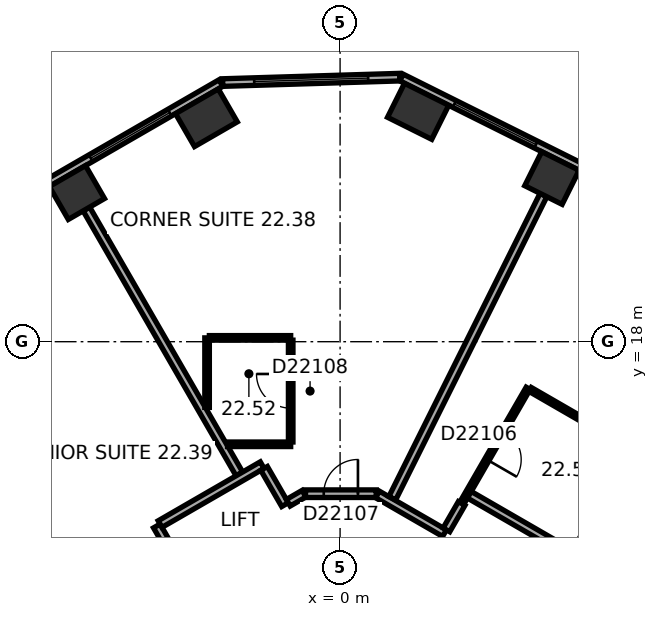
"""IFC4 building model, lengths in metres.
Left out: names, types, materials, properties, quantities, classifications, styles, units other than length and angle.
Written with IfcOpenShell. Run it as: python <this file> out.ifc"""

import sys

from ifc_helpers import new_model, si_unit, direction, frame, frame_2d, origin, origin_2d, place, context, subcontext, project, spatial, rectangle, extrude, element, fill, save


model = new_model("IFC4")
c1 = context("Model", 3, precision=1e-05, world=origin(), true_north=direction((0.0, 1.0)))
c2 = subcontext(c1, "Body", "Model", "MODEL_VIEW")
j1 = project(units=[si_unit("LENGTHUNIT", "METRE"), si_unit("PLANEANGLEUNIT", "RADIAN")], contexts=[c1])
p1 = place(None, origin())
s1 = spatial("IfcSite", under=j1, at=p1, CompositionType="ELEMENT")
p2 = place(p1, origin())
s2 = spatial("IfcBuilding", under=s1, at=p2, CompositionType="ELEMENT")
p3 = place(p2, frame((0.0, 0.0, 96.8)))
s3 = spatial("IfcBuildingStorey", under=s2, at=p3, CompositionType="ELEMENT", Elevation=96.8)
p4 = place(p3, frame((5.574, 22.306, 0.0), z_axis=(0.0, 0.0, 1.0), x_axis=(-0.894934361602, 0.44619781311, 0.0)))
e1 = element("IfcColumn", 1, at=p4, inside=s3, PredefinedType="COLUMN", context=c2, shape_type="SweptSolid", body=[
    extrude(rectangle(XDim=1.1, YDim=1.0, at=origin_2d()), origin(), (0.0, 0.0, 1.0), 3.3),
])
for number, where, z_axis, x_axis in (
    (2, (2.053, 24.062, 0.0), (0.0, 0.0, 1.0), (-0.895, 0.446, 0.0)),
    (3, (-3.518, 23.892, 0.0), (0.0, 0.0, 1.0), (-0.866, -0.5, 0.0)),
):
    element("IfcColumn", number, at=place(p3, frame(where, z_axis=z_axis, x_axis=x_axis)), inside=s3, PredefinedType="COLUMN", context=c2, shape_type="SweptSolid", body=[
        extrude(rectangle(XDim=1.3, YDim=1.0, at=origin_2d()), origin(), (0.0, 0.0, 1.0), 3.3),
    ])
p5 = place(p3, frame((-6.926, 21.925, 0.0), z_axis=(0.0, 0.0, 1.0), x_axis=(-0.866025403784, -0.5, 0.0)))
e4 = element("IfcColumn", 4, at=p5, inside=s3, PredefinedType="COLUMN", context=c2, shape_type="SweptSolid", body=[
    extrude(rectangle(XDim=1.1, YDim=1.0, at=origin_2d()), origin(), (0.0, 0.0, 1.0), 3.3),
])
p6 = place(p3, frame((20.63, 15.47, 0.0), z_axis=(0.0, 0.0, 1.0), x_axis=(-0.894934518609, 0.446197498203, 0.0)))
e5 = element("IfcWall", 5, at=p6, inside=s3, PredefinedType="STANDARD", context=c2, shape_type="SweptSolid", body=[
    extrude(rectangle(XDim=21.246, YDim=0.2, at=frame_2d((10.623, 0.0))), origin(), (0.0, 0.0, 1.0), 3.3),
])
p7 = place(p6, frame((1.553, 0.0, 0.8)))
e6 = element("IfcOpeningElement", 6, at=p7, cuts=e5, PredefinedType="OPENING", context=c2, shape_type="SweptSolid", body=[
    extrude(rectangle(XDim=2.4, YDim=1.7, at=frame_2d((1.2, 0.85))), frame((0.0, 0.11, 0.0), z_axis=(0.0, -1.0, 0.0), x_axis=(1.0, 0.0, 0.0)), (0.0, 0.0, 1.0), 0.22),
])
p8 = place(p6, frame((5.488, 0.0, 0.8)))
e7 = element("IfcOpeningElement", 7, at=p8, cuts=e5, PredefinedType="OPENING", context=c2, shape_type="SweptSolid", body=[
    extrude(rectangle(XDim=2.4, YDim=1.7, at=frame_2d((1.2, 0.85))), frame((0.0, 0.11, 0.0), z_axis=(0.0, -1.0, 0.0), x_axis=(1.0, 0.0, 0.0)), (0.0, 0.0, 1.0), 0.22),
])
p9 = place(p6, frame((9.422, 0.0, 0.8)))
e8 = element("IfcOpeningElement", 8, at=p9, cuts=e5, PredefinedType="OPENING", context=c2, shape_type="SweptSolid", body=[
    extrude(rectangle(XDim=2.4, YDim=1.7, at=frame_2d((1.2, 0.85))), frame((0.0, 0.11, 0.0), z_axis=(0.0, -1.0, 0.0), x_axis=(1.0, 0.0, 0.0)), (0.0, 0.0, 1.0), 0.22),
])
p10 = place(p6, frame((13.357, 0.0, 0.8)))
e9 = element("IfcOpeningElement", 9, at=p10, cuts=e5, PredefinedType="OPENING", context=c2, shape_type="SweptSolid", body=[
    extrude(rectangle(XDim=2.4, YDim=1.7, at=frame_2d((1.2, 0.85))), frame((0.0, 0.11, 0.0), z_axis=(0.0, -1.0, 0.0), x_axis=(1.0, 0.0, 0.0)), (0.0, 0.0, 1.0), 0.22),
])
p11 = place(p6, frame((17.292, 0.0, 0.8)))
e10 = element("IfcOpeningElement", 10, at=p11, cuts=e5, PredefinedType="OPENING", context=c2, shape_type="SweptSolid", body=[
    extrude(rectangle(XDim=2.4, YDim=1.7, at=frame_2d((1.2, 0.85))), frame((0.0, 0.11, 0.0), z_axis=(0.0, -1.0, 0.0), x_axis=(1.0, 0.0, 0.0)), (0.0, 0.0, 1.0), 0.22),
])
p12 = place(p3, frame((1.568, 24.961, 0.0), z_axis=(0.0, 0.0, 1.0), x_axis=(-0.999533359013, -0.030546099927, 0.0)))
e11 = element("IfcWall", 11, at=p12, inside=s3, PredefinedType="STANDARD", context=c2, shape_type="SweptSolid", body=[
    extrude(rectangle(XDim=4.66, YDim=0.2, at=frame_2d((2.33, 0.0))), origin(), (0.0, 0.0, 1.0), 3.3),
])
p13 = place(p12, frame((0.83, 0.0, 0.8)))
e12 = element("IfcOpeningElement", 12, at=p13, cuts=e11, PredefinedType="OPENING", context=c2, shape_type="SweptSolid", body=[
    extrude(rectangle(XDim=3.0, YDim=1.7, at=frame_2d((1.5, 0.85))), frame((0.0, 0.11, 0.0), z_axis=(0.0, -1.0, 0.0), x_axis=(1.0, 0.0, 0.0)), (0.0, 0.0, 1.0), 0.22),
])
p14 = place(p3, frame((-3.136, 24.805, 0.0), z_axis=(0.0, 0.0, 1.0), x_axis=(-0.866028291626, -0.499994998079, 0.0)))
e13 = element("IfcWall", 13, at=p14, inside=s3, PredefinedType="STANDARD", context=c2, shape_type="SweptSolid", body=[
    extrude(rectangle(XDim=21.246, YDim=0.2, at=frame_2d((10.623, 0.0))), origin(), (0.0, 0.0, 1.0), 3.3),
])
p15 = place(p14, frame((1.555, 0.0, 0.8)))
e14 = element("IfcOpeningElement", 14, at=p15, cuts=e13, PredefinedType="OPENING", context=c2, shape_type="SweptSolid", body=[
    extrude(rectangle(XDim=2.4, YDim=1.7, at=frame_2d((1.2, 0.85))), frame((0.0, 0.11, 0.0), z_axis=(0.0, -1.0, 0.0), x_axis=(1.0, 0.0, 0.0)), (0.0, 0.0, 1.0), 0.22),
])
p16 = place(p14, frame((5.489, 0.0, 0.8)))
e15 = element("IfcOpeningElement", 15, at=p16, cuts=e13, PredefinedType="OPENING", context=c2, shape_type="SweptSolid", body=[
    extrude(rectangle(XDim=2.4, YDim=1.7, at=frame_2d((1.2, 0.85))), frame((0.0, 0.11, 0.0), z_axis=(0.0, -1.0, 0.0), x_axis=(1.0, 0.0, 0.0)), (0.0, 0.0, 1.0), 0.22),
])
p17 = place(p14, frame((9.424, 0.0, 0.8)))
e16 = element("IfcOpeningElement", 16, at=p17, cuts=e13, PredefinedType="OPENING", context=c2, shape_type="SweptSolid", body=[
    extrude(rectangle(XDim=2.4, YDim=1.7, at=frame_2d((1.2, 0.85))), frame((0.0, 0.11, 0.0), z_axis=(0.0, -1.0, 0.0), x_axis=(1.0, 0.0, 0.0)), (0.0, 0.0, 1.0), 0.22),
])
p18 = place(p14, frame((13.358, 0.0, 0.8)))
e17 = element("IfcOpeningElement", 17, at=p18, cuts=e13, PredefinedType="OPENING", context=c2, shape_type="SweptSolid", body=[
    extrude(rectangle(XDim=2.4, YDim=1.7, at=frame_2d((1.2, 0.85))), frame((0.0, 0.11, 0.0), z_axis=(0.0, -1.0, 0.0), x_axis=(1.0, 0.0, 0.0)), (0.0, 0.0, 1.0), 0.22),
])
p19 = place(p14, frame((17.293, 0.0, 0.8)))
e18 = element("IfcOpeningElement", 18, at=p19, cuts=e13, PredefinedType="OPENING", context=c2, shape_type="SweptSolid", body=[
    extrude(rectangle(XDim=2.4, YDim=1.7, at=frame_2d((1.2, 0.85))), frame((0.0, 0.11, 0.0), z_axis=(0.0, -1.0, 0.0), x_axis=(1.0, 0.0, 0.0)), (0.0, 0.0, 1.0), 0.22),
])
p20 = place(p3, frame((-7.934, 13.133, 0.0), z_axis=(0.0, 0.0, 1.0), x_axis=(0.499938597367, -0.866060851709, 0.0)))
e19 = element("IfcWall", 19, at=p20, inside=s3, PredefinedType="PARTITIONING", context=c2, shape_type="SweptSolid", body=[
    extrude(rectangle(XDim=2.64, YDim=0.12, at=frame_2d((1.32, 0.0))), origin(), (0.0, 0.0, 1.0), 3.05),
])
p21 = place(p20, frame((0.87, 0.0, 0.0)))
e20 = element("IfcOpeningElement", 20, at=p21, cuts=e19, PredefinedType="OPENING", context=c2, shape_type="SweptSolid", body=[
    extrude(rectangle(XDim=0.9, YDim=2.1, at=frame_2d((0.45, 1.05))), frame((0.0, 0.07, 0.0), z_axis=(0.0, -1.0, 0.0), x_axis=(1.0, 0.0, 0.0)), (0.0, 0.0, 1.0), 0.14),
])
p22 = place(p3, frame((-6.676, 21.492, 0.0), z_axis=(0.0, 0.0, 1.0), x_axis=(0.500011263043, -0.866018900966, 0.0)))
e21 = element("IfcWall", 21, at=p22, inside=s3, PredefinedType="PARTITIONING", context=c2, shape_type="SweptSolid", body=[
    extrude(rectangle(XDim=8.049, YDim=0.2, at=frame_2d((4.024, 0.0))), origin(), (0.0, 0.0, 1.0), 3.05),
])
p23 = place(p3, frame((-4.823, 13.152, 0.0), z_axis=(0.0, 0.0, 1.0), x_axis=(0.499986357472, -0.866033280158, 0.0)))
e22 = element("IfcWall", 22, at=p23, inside=s3, PredefinedType="PARTITIONING", context=c2, shape_type="SweptSolid", body=[
    extrude(rectangle(XDim=1.201, YDim=0.2, at=frame_2d((0.601, 0.0))), origin(), (0.0, 0.0, 1.0), 3.05),
])
p24 = place(p3, frame((-3.5, 16.271, 0.0), z_axis=(0.0, 0.0, 1.0), x_axis=(0.0, 1.0, 0.0)))
e23 = element("IfcWall", 23, at=p24, inside=s3, PredefinedType="PARTITIONING", context=c2, shape_type="SweptSolid", body=[
    extrude(rectangle(XDim=1.829, YDim=0.12, at=frame_2d((0.915, 0.0))), origin(), (0.0, 0.0, 1.0), 3.05),
])
p25 = place(p3, frame((-3.44, 18.101, 0.0), z_axis=(0.0, 0.0, 1.0), x_axis=(1.0, 0.0, 0.0)))
e24 = element("IfcWall", 24, at=p25, inside=s3, PredefinedType="PARTITIONING", context=c2, shape_type="SweptSolid", body=[
    extrude(rectangle(XDim=2.14, YDim=0.12, at=frame_2d((1.07, 0.0))), origin(), (0.0, 0.0, 1.0), 3.05),
])
p26 = place(p3, frame((-2.05, 14.752, 0.0), z_axis=(0.0, 0.0, 1.0), x_axis=(-0.866030936828, -0.499990416364, 0.0)))
e25 = element("IfcWall", 25, at=p26, inside=s3, PredefinedType="PARTITIONING", context=c2, shape_type="SweptSolid", body=[
    extrude(rectangle(XDim=3.102, YDim=0.2, at=frame_2d((1.551, 0.0))), origin(), (0.0, 0.0, 1.0), 3.05),
])
p27 = place(p3, frame((-1.449, 13.712, 0.0), z_axis=(0.0, 0.0, 1.0), x_axis=(-0.499978356969, 0.866037899034, 0.0)))
e26 = element("IfcWall", 26, at=p27, inside=s3, PredefinedType="PARTITIONING", context=c2, shape_type="SweptSolid", body=[
    extrude(rectangle(XDim=1.101, YDim=0.2, at=frame_2d((0.551, 0.0))), origin(), (0.0, 0.0, 1.0), 3.05),
])
p28 = place(p3, frame((-1.3, 15.301, 0.0), z_axis=(0.0, 0.0, 1.0), x_axis=(-1.0, 0.0, 0.0)))
e27 = element("IfcWall", 27, at=p28, inside=s3, PredefinedType="PARTITIONING", context=c2, shape_type="SweptSolid", body=[
    extrude(rectangle(XDim=1.661, YDim=0.12, at=frame_2d((0.831, 0.0))), origin(), (0.0, 0.0, 1.0), 3.05),
])
p29 = place(p3, frame((-1.3, 18.041, 0.0), z_axis=(0.0, 0.0, 1.0), x_axis=(0.0, -1.0, 0.0)))
e28 = element("IfcWall", 28, at=p29, inside=s3, PredefinedType="PARTITIONING", context=c2, shape_type="SweptSolid", body=[
    extrude(rectangle(XDim=2.68, YDim=0.12, at=frame_2d((1.34, 0.0))), origin(), (0.0, 0.0, 1.0), 3.05),
])
p30 = place(p29, frame((0.89, 0.0, 0.0)))
e29 = element("IfcOpeningElement", 29, at=p30, cuts=e28, PredefinedType="OPENING", context=c2, shape_type="SweptSolid", body=[
    extrude(rectangle(XDim=0.9, YDim=2.1, at=frame_2d((0.45, 1.05))), frame((0.0, 0.07, 0.0), z_axis=(0.0, -1.0, 0.0), x_axis=(1.0, 0.0, 0.0)), (0.0, 0.0, 1.0), 0.14),
])
p31 = place(p3, frame((-0.95, 14.001, 0.0), z_axis=(0.0, 0.0, 1.0), x_axis=(-0.86609177584, -0.499885022602, 0.0)))
e30 = element("IfcWall", 30, at=p31, inside=s3, PredefinedType="PARTITIONING", context=c2, shape_type="SweptSolid", body=[
    extrude(rectangle(XDim=0.477, YDim=0.2, at=frame_2d((0.238, 0.0))), origin(), (0.0, 0.0, 1.0), 3.05),
])
p32 = place(p3, frame((0.95, 14.001, 0.0), z_axis=(0.0, 0.0, 1.0), x_axis=(-1.0, 0.0, 0.0)))
e31 = element("IfcWall", 31, at=p32, inside=s3, PredefinedType="PARTITIONING", context=c2, shape_type="SweptSolid", body=[
    extrude(rectangle(XDim=1.86, YDim=0.2, at=frame_2d((0.93, 0.0))), origin(), (0.0, 0.0, 1.0), 3.05),
])
p33 = place(p32, frame((0.48, 0.0, 0.0)))
e32 = element("IfcOpeningElement", 32, at=p33, cuts=e31, PredefinedType="OPENING", context=c2, shape_type="SweptSolid", body=[
    extrude(rectangle(XDim=0.9, YDim=2.1, at=frame_2d((0.45, 1.05))), frame((0.0, 0.11, 0.0), z_axis=(0.0, -1.0, 0.0), x_axis=(1.0, 0.0, 0.0)), (0.0, 0.0, 1.0), 0.22),
])
p34 = place(p3, frame((2.748, 12.962, 0.0), z_axis=(0.0, 0.0, 1.0), x_axis=(-0.866013897511, 0.50001992892, 0.0)))
e33 = element("IfcWall", 33, at=p34, inside=s3, PredefinedType="PARTITIONING", context=c2, shape_type="SweptSolid", body=[
    extrude(rectangle(XDim=2.037, YDim=0.2, at=frame_2d((1.018, 0.0))), origin(), (0.0, 0.0, 1.0), 3.05),
])
p35 = place(p3, frame((3.199, 13.743, 0.0), z_axis=(0.0, 0.0, 1.0), x_axis=(-0.500170954823, -0.865926680471, 0.0)))
e34 = element("IfcWall", 34, at=p35, inside=s3, PredefinedType="PARTITIONING", context=c2, shape_type="SweptSolid", body=[
    extrude(rectangle(XDim=0.801, YDim=0.2, at=frame_2d((0.4, 0.0))), origin(), (0.0, 0.0, 1.0), 3.05),
])
p36 = place(p3, frame((3.232, 13.8, 0.0), z_axis=(0.0, 0.0, 1.0), x_axis=(0.499993265928, 0.866029291668, 0.0)))
e35 = element("IfcWall", 35, at=p36, inside=s3, PredefinedType="PARTITIONING", context=c2, shape_type="SweptSolid", body=[
    extrude(rectangle(XDim=3.434, YDim=0.12, at=frame_2d((1.717, 0.0))), origin(), (0.0, 0.0, 1.0), 3.05),
])
p37 = place(p36, frame((1.267, 0.0, 0.0)))
e36 = element("IfcOpeningElement", 36, at=p37, cuts=e35, PredefinedType="OPENING", context=c2, shape_type="SweptSolid", body=[
    extrude(rectangle(XDim=0.9, YDim=2.1, at=frame_2d((0.45, 1.05))), frame((0.0, 0.07, 0.0), z_axis=(0.0, -1.0, 0.0), x_axis=(1.0, 0.0, 0.0)), (0.0, 0.0, 1.0), 0.14),
])
p38 = place(p3, frame((5.001, 16.744, 0.0), z_axis=(0.0, 0.0, 1.0), x_axis=(0.866009488468, -0.500027565123, 0.0)))
e37 = element("IfcWall", 37, at=p38, inside=s3, PredefinedType="PARTITIONING", context=c2, shape_type="SweptSolid", body=[
    extrude(rectangle(XDim=3.14, YDim=0.12, at=frame_2d((1.57, 0.0))), origin(), (0.0, 0.0, 1.0), 3.05),
])
p39 = place(p3, frame((5.351, 21.859, 0.0), z_axis=(0.0, 0.0, 1.0), x_axis=(-0.446205309328, -0.894930624086, 0.0)))
e38 = element("IfcWall", 38, at=p39, inside=s3, PredefinedType="PARTITIONING", context=c2, shape_type="SweptSolid", body=[
    extrude(rectangle(XDim=8.913, YDim=0.2, at=frame_2d((4.457, 0.0))), origin(), (0.0, 0.0, 1.0), 2.6),
])
p40 = place(p3, frame((7.69, 15.122, 0.0), z_axis=(0.0, 0.0, 1.0), x_axis=(-0.499991248344, -0.866030456496, 0.0)))
e39 = element("IfcWall", 39, at=p40, inside=s3, PredefinedType="PARTITIONING", context=c2, shape_type="SweptSolid", body=[
    extrude(rectangle(XDim=3.04, YDim=0.12, at=frame_2d((1.52, 0.0))), origin(), (0.0, 0.0, 1.0), 3.05),
])
p41 = place(p3, frame((10.885, 9.652, 0.0), z_axis=(0.0, 0.0, 1.0), x_axis=(-0.866033630405, 0.499985750804, 0.0)))
e40 = element("IfcWall", 40, at=p41, inside=s3, PredefinedType="PARTITIONING", context=c2, shape_type="SweptSolid", body=[
    extrude(rectangle(XDim=8.642, YDim=0.2, at=frame_2d((4.321, 0.0))), origin(), (0.0, 0.0, 1.0), 3.05),
])
p42 = place(p41, frame((2.276, 0.0, 0.0)))
e41 = element("IfcOpeningElement", 41, at=p42, cuts=e40, PredefinedType="OPENING", context=c2, shape_type="SweptSolid", body=[
    extrude(rectangle(XDim=0.9, YDim=2.1, at=frame_2d((0.45, 1.05))), frame((0.0, 0.11, 0.0), z_axis=(0.0, -1.0, 0.0), x_axis=(1.0, 0.0, 0.0)), (0.0, 0.0, 1.0), 0.22),
])
p43 = place(p11, origin())
e42 = element("IfcWindow", 42, at=p43, inside=s3, PartitioningType="SINGLE_PANEL", PredefinedType="WINDOW", context=c2, shape_type="SweptSolid", body=[
    extrude(rectangle(XDim=2.4, YDim=1.7, at=frame_2d((1.2, 0.85))), frame((0.0, 0.03, 0.0), z_axis=(0.0, -1.0, 0.0), x_axis=(1.0, 0.0, 0.0)), (0.0, 0.0, 1.0), 0.06),
])
fill(e10, e42)
p44 = place(p13, origin())
e43 = element("IfcWindow", 43, at=p44, inside=s3, PartitioningType="SINGLE_PANEL", PredefinedType="WINDOW", context=c2, shape_type="SweptSolid", body=[
    extrude(rectangle(XDim=3.0, YDim=1.7, at=frame_2d((1.5, 0.85))), frame((0.0, 0.03, 0.0), z_axis=(0.0, -1.0, 0.0), x_axis=(1.0, 0.0, 0.0)), (0.0, 0.0, 1.0), 0.06),
])
fill(e12, e43)
p45 = place(p15, origin())
e44 = element("IfcWindow", 44, at=p45, inside=s3, PartitioningType="SINGLE_PANEL", PredefinedType="WINDOW", context=c2, shape_type="SweptSolid", body=[
    extrude(rectangle(XDim=2.4, YDim=1.7, at=frame_2d((1.2, 0.85))), frame((0.0, 0.03, 0.0), z_axis=(0.0, -1.0, 0.0), x_axis=(1.0, 0.0, 0.0)), (0.0, 0.0, 1.0), 0.06),
])
fill(e14, e44)
p46 = place(p37, origin())
e45 = element("IfcDoor", 45, at=p46, inside=s3, OperationType="SINGLE_SWING_LEFT", PredefinedType="DOOR", context=c2, shape_type="SweptSolid", body=[
    extrude(rectangle(XDim=0.9, YDim=2.1, at=frame_2d((0.45, 1.05))), frame((0.0, 0.025, 0.0), z_axis=(0.0, -1.0, 0.0), x_axis=(1.0, 0.0, 0.0)), (0.0, 0.0, 1.0), 0.05),
])
fill(e36, e45)
p47 = place(p33, origin())
e46 = element("IfcDoor", 46, at=p47, inside=s3, OperationType="SINGLE_SWING_LEFT", PredefinedType="DOOR", context=c2, shape_type="SweptSolid", body=[
    extrude(rectangle(XDim=0.9, YDim=2.1, at=frame_2d((0.45, 1.05))), frame((0.0, 0.025, 0.0), z_axis=(0.0, -1.0, 0.0), x_axis=(1.0, 0.0, 0.0)), (0.0, 0.0, 1.0), 0.05),
])
fill(e32, e46)
p48 = place(p30, origin())
e47 = element("IfcDoor", 47, at=p48, inside=s3, OperationType="SINGLE_SWING_LEFT", PredefinedType="DOOR", context=c2, shape_type="SweptSolid", body=[
    extrude(rectangle(XDim=0.9, YDim=2.1, at=frame_2d((0.45, 1.05))), frame((0.0, 0.025, 0.0), z_axis=(0.0, -1.0, 0.0), x_axis=(1.0, 0.0, 0.0)), (0.0, 0.0, 1.0), 0.05),
])
fill(e29, e47)
save(model, sys.argv[1])
